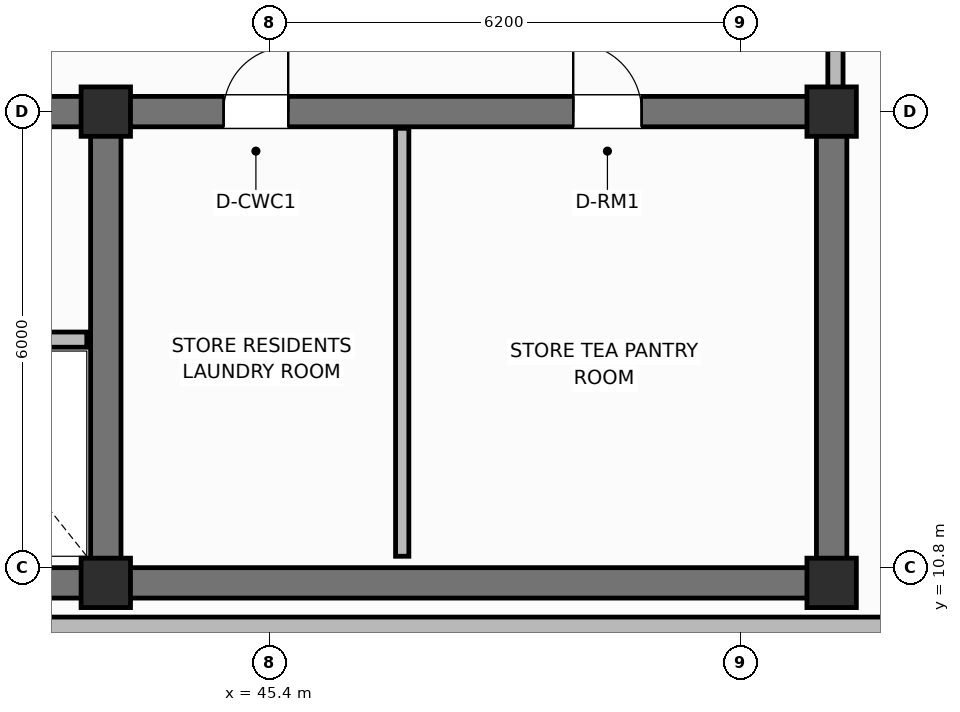
"""IFC4 building model, lengths in metres.
Left out: names, types, materials, properties, quantities, classifications, styles, units other than length and angle.
Written with IfcOpenShell. Run it as: python <this file> out.ifc"""

import sys

from ifc_helpers import new_model, si_unit, direction, frame, frame_2d, origin, origin_2d, place, context, subcontext, project, spatial, rectangle, extrude, element, fill, save


model = new_model("IFC4")
c1 = context("Model", 3, precision=1e-05, world=origin(), true_north=direction((0.0, 1.0)))
c2 = subcontext(c1, "Body", "Model", "MODEL_VIEW")
j1 = project(units=[si_unit("LENGTHUNIT", "METRE"), si_unit("PLANEANGLEUNIT", "RADIAN")], contexts=[c1])
p1 = place(None, origin())
s1 = spatial("IfcSite", under=j1, at=p1, CompositionType="ELEMENT")
p2 = place(p1, origin())
s2 = spatial("IfcBuilding", under=s1, at=p2, CompositionType="ELEMENT")
p3 = place(p2, frame((0.0, 0.0, 312.8)))
s3 = spatial("IfcBuildingStorey", under=s2, at=p3, CompositionType="ELEMENT", Elevation=312.8)
p4 = place(p3, frame((52.8, 10.6, 0.0), z_axis=(0.0, 0.0, 1.0), x_axis=(-1.0, 0.0, 0.0)))
e1 = element("IfcWall", 1, at=p4, inside=s3, PredefinedType="SHEAR", context=c2, shape_type="SweptSolid", body=[
    extrude(rectangle(XDim=27.2, YDim=0.4, at=frame_2d((13.6, 0.0))), origin(), (0.0, 0.0, 1.0), 3.6),
])
p5 = place(p3, frame((52.8, 10.8, 0.0), z_axis=(0.0, 0.0, 1.0), x_axis=(0.0, 1.0, 0.0)))
e2 = element("IfcWall", 2, at=p5, inside=s3, PredefinedType="SHEAR", context=c2, shape_type="SweptSolid", body=[
    extrude(rectangle(XDim=5.8, YDim=0.4, at=frame_2d((2.9, 0.0))), origin(), (0.0, 0.0, 1.0), 3.6),
])
p6 = place(p3, frame((25.6, 16.8, 0.0), z_axis=(0.0, 0.0, 1.0), x_axis=(1.0, 0.0, 0.0)))
e3 = element("IfcWall", 3, at=p6, inside=s3, PredefinedType="SHEAR", context=c2, shape_type="SweptSolid", body=[
    extrude(rectangle(XDim=27.2, YDim=0.4, at=frame_2d((13.6, 0.0))), origin(), (0.0, 0.0, 1.0), 3.6),
])
p7 = place(p6, frame((1.8, 0.0, 0.0)))
e4 = element("IfcOpeningElement", 4, at=p7, cuts=e3, PredefinedType="OPENING", context=c2, shape_type="SweptSolid", body=[
    extrude(rectangle(XDim=1.1, YDim=2.15, at=frame_2d((0.55, 1.075))), frame((0.0, 0.21, 0.0), z_axis=(0.0, -1.0, 0.0), x_axis=(1.0, 0.0, 0.0)), (0.0, 0.0, 1.0), 0.42),
])
p8 = place(p6, frame((5.6, 0.0, 0.0)))
e5 = element("IfcOpeningElement", 5, at=p8, cuts=e3, PredefinedType="OPENING", context=c2, shape_type="SweptSolid", body=[
    extrude(rectangle(XDim=0.85, YDim=2.1, at=frame_2d((0.425, 1.05))), frame((0.0, 0.21, 0.0), z_axis=(0.0, -1.0, 0.0), x_axis=(1.0, 0.0, 0.0)), (0.0, 0.0, 1.0), 0.42),
])
p9 = place(p6, frame((13.0, 0.0, 0.0)))
e6 = element("IfcOpeningElement", 6, at=p9, cuts=e3, PredefinedType="OPENING", context=c2, shape_type="SweptSolid", body=[
    extrude(rectangle(XDim=1.2, YDim=2.15, at=frame_2d((0.6, 1.075))), frame((0.0, 0.21, 0.0), z_axis=(0.0, -1.0, 0.0), x_axis=(1.0, 0.0, 0.0)), (0.0, 0.0, 1.0), 0.42),
])
p10 = place(p6, frame((19.2, 0.0, 0.0)))
e7 = element("IfcOpeningElement", 7, at=p10, cuts=e3, PredefinedType="OPENING", context=c2, shape_type="SweptSolid", body=[
    extrude(rectangle(XDim=0.85, YDim=2.1, at=frame_2d((0.425, 1.05))), frame((0.0, 0.21, 0.0), z_axis=(0.0, -1.0, 0.0), x_axis=(1.0, 0.0, 0.0)), (0.0, 0.0, 1.0), 0.42),
])
p11 = place(p6, frame((23.8, 0.0, 0.0)))
e8 = element("IfcOpeningElement", 8, at=p11, cuts=e3, PredefinedType="OPENING", context=c2, shape_type="SweptSolid", body=[
    extrude(rectangle(XDim=0.9, YDim=2.1, at=frame_2d((0.45, 1.05))), frame((0.0, 0.21, 0.0), z_axis=(0.0, -1.0, 0.0), x_axis=(1.0, 0.0, 0.0)), (0.0, 0.0, 1.0), 0.42),
])
p12 = place(p3, frame((43.25, 10.8, 0.0), z_axis=(0.0, 0.0, 1.0), x_axis=(0.0, 1.0, 0.0)))
e9 = element("IfcWall", 9, at=p12, inside=s3, PredefinedType="SHEAR", context=c2, shape_type="SweptSolid", body=[
    extrude(rectangle(XDim=5.8, YDim=0.4, at=frame_2d((2.9, 0.0))), origin(), (0.0, 0.0, 1.0), 3.6),
])
for number, where, z_axis, x_axis in (
    (10, (43.25, 10.6, 0.0), (0.0, 0.0, 1.0), (1.0, 0.0, 0.0)),
    (11, (43.25, 16.8, 0.0), (0.0, 0.0, 1.0), (1.0, 0.0, 0.0)),
    (12, (52.8, 10.6, 0.0), (0.0, 0.0, 1.0), (1.0, 0.0, 0.0)),
    (13, (52.8, 16.8, 0.0), (0.0, 0.0, 1.0), (1.0, 0.0, 0.0)),
):
    element("IfcColumn", number, at=place(p3, frame(where, z_axis=z_axis, x_axis=x_axis)), inside=s3, PredefinedType="COLUMN", context=c2, shape_type="SweptSolid", body=[
        extrude(rectangle(XDim=0.65, YDim=0.65, at=origin_2d()), origin(), (0.0, 0.0, 1.0), 3.6),
    ])
p13 = place(p3, frame((23.76, 10.0, 0.0), z_axis=(0.0, 0.0, 1.0), x_axis=(1.0, 0.0, 0.0)))
e14 = element("IfcWall", 14, at=p13, inside=s3, PredefinedType="SOLIDWALL", context=c2, shape_type="SweptSolid", body=[
    extrude(rectangle(XDim=30.88, YDim=0.3, at=frame_2d((15.44, 0.0))), origin(), (0.0, 0.0, 1.0), 2.84),
])
p14 = place(p3, frame((35.4, 13.8, 0.0), z_axis=(0.0, 0.0, 1.0), x_axis=(1.0, 0.0, 0.0)))
e15 = element("IfcWall", 15, at=p14, inside=s3, PredefinedType="PARTITIONING", context=c2, shape_type="SweptSolid", body=[
    extrude(rectangle(XDim=7.6, YDim=0.2, at=frame_2d((3.8, 0.0))), origin(), (0.0, 0.0, 1.0), 2.2),
])
p15 = place(p14, frame((0.7, 0.0, 0.0)))
e16 = element("IfcOpeningElement", 16, at=p15, cuts=e15, PredefinedType="OPENING", context=c2, shape_type="SweptSolid", body=[
    extrude(rectangle(XDim=1.1, YDim=2.15, at=frame_2d((0.55, 1.075))), frame((0.0, 0.11, 0.0), z_axis=(0.0, -1.0, 0.0), x_axis=(1.0, 0.0, 0.0)), (0.0, 0.0, 1.0), 0.22),
])
p16 = place(p14, frame((3.35, 0.0, 0.0)))
e17 = element("IfcOpeningElement", 17, at=p16, cuts=e15, PredefinedType="OPENING", context=c2, shape_type="SweptSolid", body=[
    extrude(rectangle(XDim=1.2, YDim=2.15, at=frame_2d((0.6, 1.075))), frame((0.0, 0.11, 0.0), z_axis=(0.0, -1.0, 0.0), x_axis=(1.0, 0.0, 0.0)), (0.0, 0.0, 1.0), 0.22),
])
p17 = place(p3, frame((47.15, 10.95, 0.0), z_axis=(0.0, 0.0, 1.0), x_axis=(0.0, 1.0, 0.0)))
e18 = element("IfcWall", 18, at=p17, inside=s3, PredefinedType="PARTITIONING", context=c2, shape_type="SweptSolid", body=[
    extrude(rectangle(XDim=5.63, YDim=0.175, at=frame_2d((2.815, 0.0))), origin(), (0.0, 0.0, 1.0), 2.54),
])
p18 = place(p3, frame((52.85, 16.95, 0.0), z_axis=(0.0, 0.0, 1.0), x_axis=(0.0, 1.0, 0.0)))
e19 = element("IfcWall", 19, at=p18, inside=s3, PredefinedType="PARTITIONING", context=c2, shape_type="SweptSolid", body=[
    extrude(rectangle(XDim=2.37, YDim=0.2, at=frame_2d((1.185, 0.0))), origin(), (0.0, 0.0, 1.0), 2.54),
])
p19 = place(p10, origin())
e20 = element("IfcDoor", 20, at=p19, inside=s3, OperationType="SINGLE_SWING_RIGHT", PredefinedType="DOOR", context=c2, shape_type="SweptSolid", body=[
    extrude(rectangle(XDim=0.85, YDim=2.1, at=frame_2d((0.425, 1.05))), frame((0.0, 0.025, 0.0), z_axis=(0.0, -1.0, 0.0), x_axis=(1.0, 0.0, 0.0)), (0.0, 0.0, 1.0), 0.05),
])
fill(e7, e20)
p20 = place(p11, origin())
e21 = element("IfcDoor", 21, at=p20, inside=s3, OperationType="SINGLE_SWING_LEFT", PredefinedType="DOOR", context=c2, shape_type="SweptSolid", body=[
    extrude(rectangle(XDim=0.9, YDim=2.1, at=frame_2d((0.45, 1.05))), frame((0.0, 0.025, 0.0), z_axis=(0.0, -1.0, 0.0), x_axis=(1.0, 0.0, 0.0)), (0.0, 0.0, 1.0), 0.05),
])
fill(e8, e21)
save(model, sys.argv[1])
